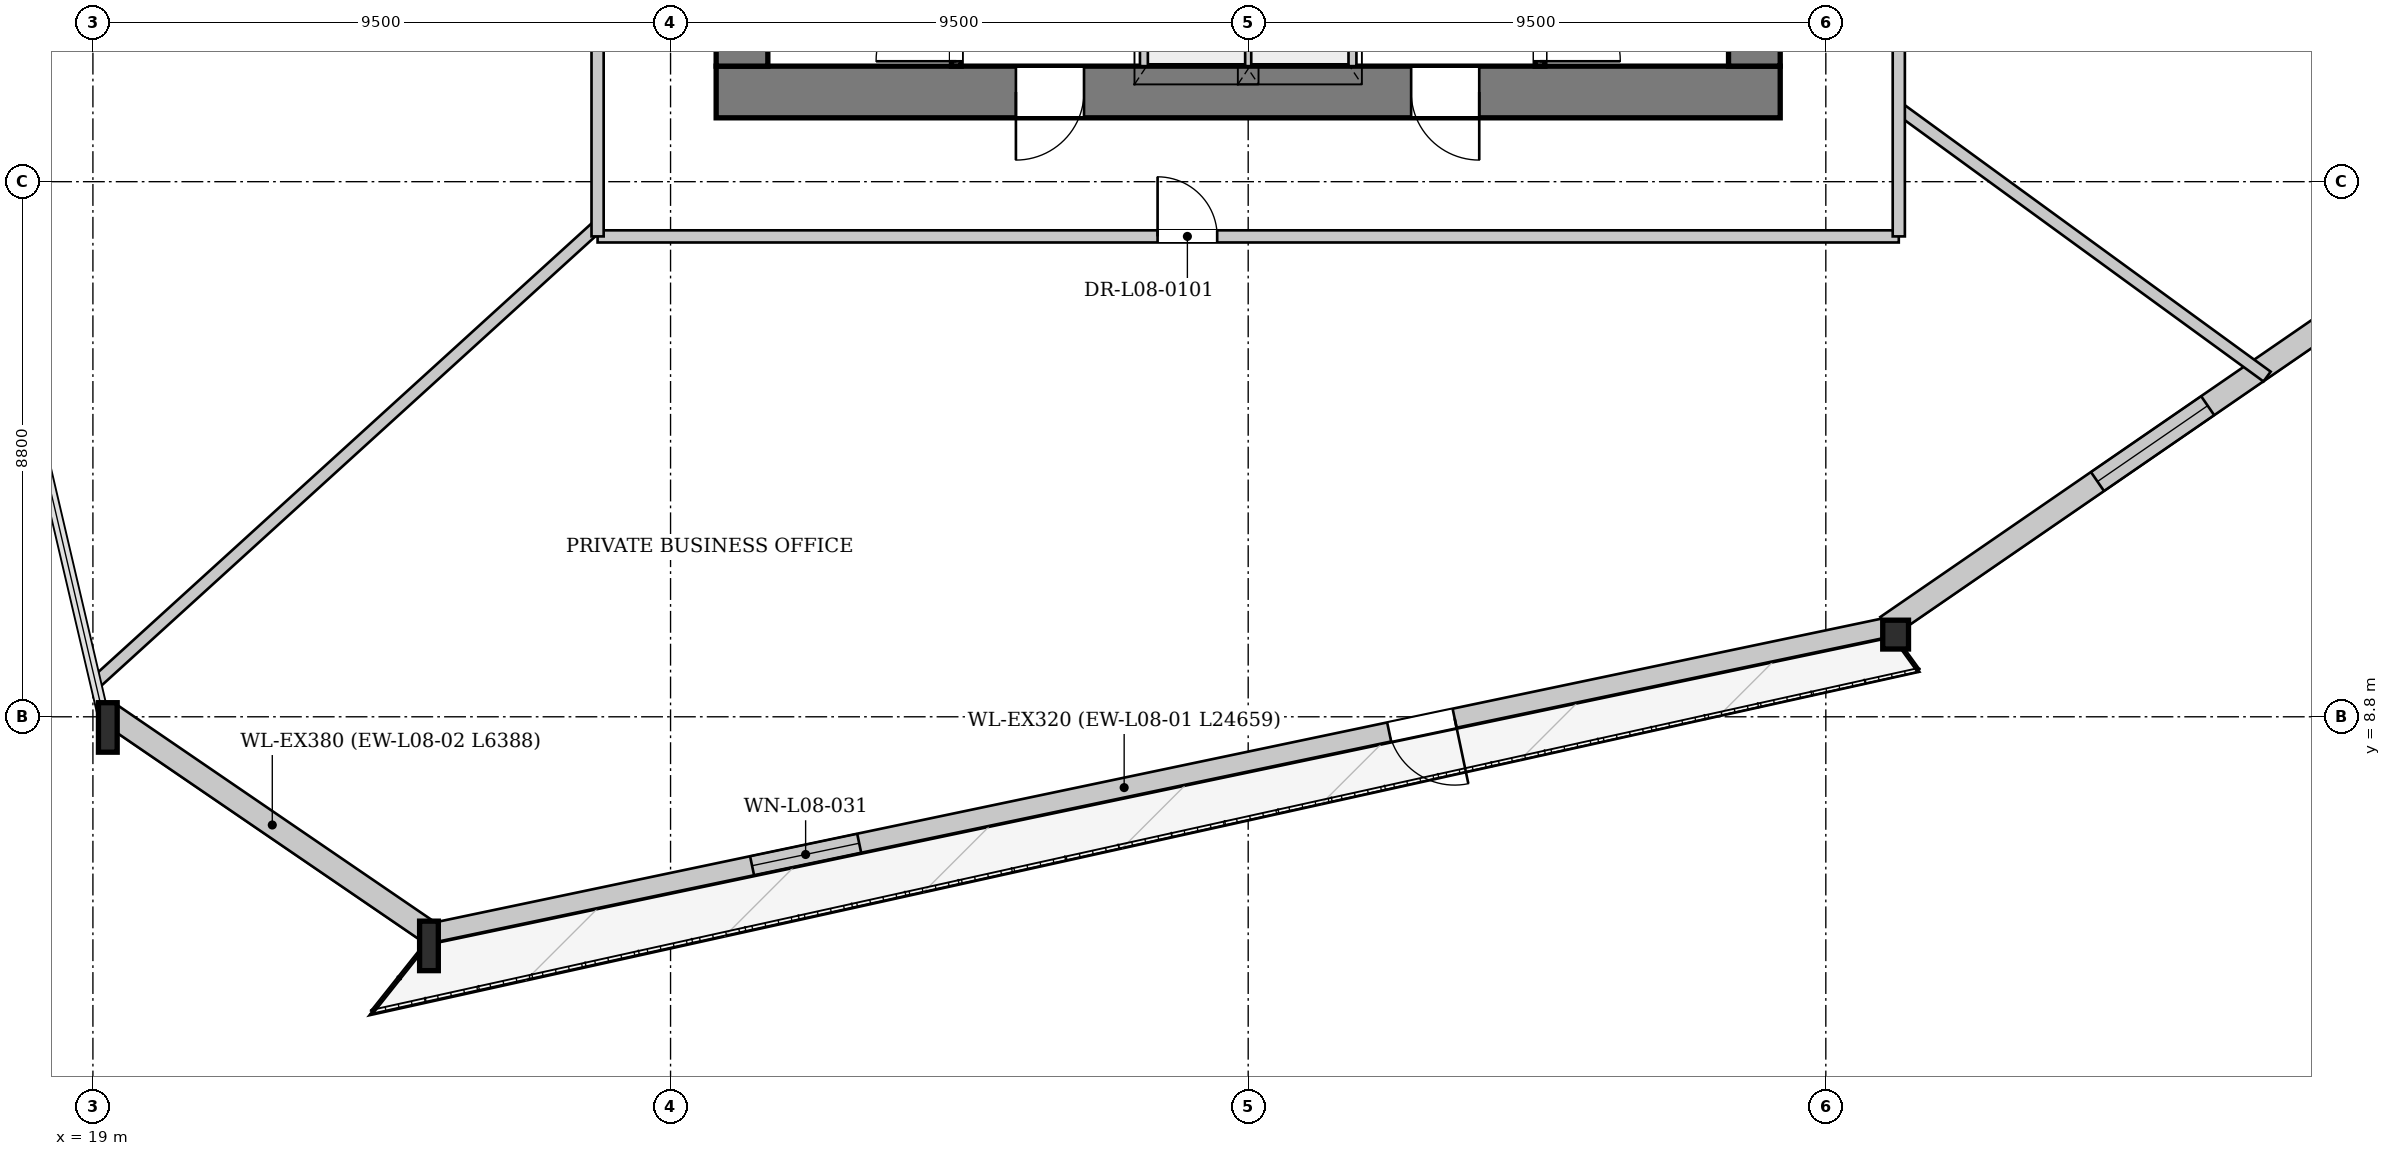
"""IFC4 building model, lengths in metres.
Left out: names, types, materials, properties, quantities, classifications, styles, units other than length and angle.
Written with IfcOpenShell. Run it as: python <this file> out.ifc"""

import sys

from ifc_helpers import new_model, si_unit, direction, frame, frame_2d, origin, origin_2d, place, context, subcontext, project, spatial, rectangle, i_section, extrude, source, transform, mapped, element, fill, save


model = new_model("IFC4")
c1 = context("Model", 3, precision=1e-05, world=origin(), true_north=direction((0.0, 1.0)))
c2 = subcontext(c1, "Body", "Model", "MODEL_VIEW")
j1 = project(units=[si_unit("LENGTHUNIT", "METRE"), si_unit("PLANEANGLEUNIT", "RADIAN")], contexts=[c1])
p1 = place(None, origin())
s1 = spatial("IfcSite", under=j1, at=p1, CompositionType="ELEMENT")
p2 = place(p1, origin())
s2 = spatial("IfcBuilding", under=s1, at=p2, CompositionType="ELEMENT")
p3 = place(p2, frame((0.0, 0.0, 36.4)))
s3 = spatial("IfcBuildingStorey", under=s2, at=p3, CompositionType="ELEMENT", Elevation=36.4)
m1 = source(origin(), c2, "Body", "SweptSolid", [
    extrude(i_section(OverallWidth=0.308, OverallDepth=0.814, WebThickness=0.021, FlangeThickness=0.04, at=origin_2d()), origin(), (0.0, 0.0, 1.0), 3.387),
])
p4 = place(p3, frame((19.206, 8.666, 0.0), z_axis=(0.023138869446, -0.024148041323, 0.999440575933), x_axis=(0.722033065516, 0.691858549345, 0.0)))
e1 = element("IfcColumn", 1, at=p4, inside=s3, PredefinedType="COLUMN", context=c2, shape_type="MappedRepresentation", body=[
    mapped(m1, transform((0.0, 0.0, 0.0), x_axis=(1.0, 0.0, 0.0), y_axis=(0.0, 1.0, 0.0), z_axis=(0.0, 0.0, 1.0), scale=1.0)),
])
m2 = source(origin(), c2, "Body", "SweptSolid", [
    extrude(i_section(OverallWidth=0.308, OverallDepth=0.814, WebThickness=0.021, FlangeThickness=0.04, at=origin_2d()), origin(), (0.0, 0.0, 1.0), 3.387),
])
p5 = place(p3, frame((24.479, 5.062, 0.0), z_axis=(0.027824902289, -0.017372542621, 0.99946183998), x_axis=(0.529603821593, 0.84824512504, 0.0)))
e2 = element("IfcColumn", 2, at=p5, inside=s3, PredefinedType="COLUMN", context=c2, shape_type="MappedRepresentation", body=[
    mapped(m2, transform((0.0, 0.0, 0.0), x_axis=(1.0, 0.0, 0.0), y_axis=(0.0, 1.0, 0.0), z_axis=(0.0, 0.0, 1.0), scale=1.0)),
])
m3 = source(origin(), c2, "Body", "SweptSolid", [
    extrude(i_section(OverallWidth=0.424, OverallDepth=0.474, WebThickness=0.043, FlangeThickness=0.068, at=origin_2d()), origin(), (0.0, 0.0, 1.0), 3.386),
])
p6 = place(p3, frame((48.612, 10.128, 0.0), z_axis=(0.02119771687, 0.01369920478, 0.999681443555), x_axis=(-0.54277739367, 0.839876598627, 0.0)))
e3 = element("IfcColumn", 3, at=p6, inside=s3, PredefinedType="COLUMN", context=c2, shape_type="MappedRepresentation", body=[
    mapped(m3, transform((0.0, 0.0, 0.0), x_axis=(1.0, 0.0, 0.0), y_axis=(0.0, 1.0, 0.0), z_axis=(0.0, 0.0, 1.0), scale=1.0)),
])
p7 = place(p3, frame((48.579, 10.285, 0.0), z_axis=(0.0, 0.0, 1.0), x_axis=(-0.978662775372, -0.205473044709, 0.0)))
e4 = element("IfcWall", 4, at=p7, inside=s3, PredefinedType="SOLIDWALL", context=c2, shape_type="SweptSolid", body=[
    extrude(rectangle(XDim=24.658, YDim=0.32, at=frame_2d((12.329, 0.0))), origin(), (0.0, 0.0, 1.0), 2.592),
])
p8 = place(p7, frame((7.341, 0.0, 0.0)))
e5 = element("IfcOpeningElement", 5, at=p8, cuts=e4, PredefinedType="OPENING", context=c2, shape_type="SweptSolid", body=[
    extrude(rectangle(XDim=1.1, YDim=2.3, at=frame_2d((0.55, 1.15))), frame((0.0, 0.17, 0.0), z_axis=(0.0, -1.0, 0.0), x_axis=(1.0, 0.0, 0.0)), (0.0, 0.0, 1.0), 0.34),
])
p9 = place(p7, frame((17.347, 0.0, 0.272)))
e6 = element("IfcOpeningElement", 6, at=p9, cuts=e4, PredefinedType="OPENING", context=c2, shape_type="SweptSolid", body=[
    extrude(rectangle(XDim=1.8, YDim=2.2, at=frame_2d((0.9, 1.1))), frame((0.0, 0.17, 0.0), z_axis=(0.0, -1.0, 0.0), x_axis=(1.0, 0.0, 0.0)), (0.0, 0.0, 1.0), 0.34),
])
p10 = place(p3, frame((24.587, 5.219, 0.0), z_axis=(0.0, 0.0, 1.0), x_axis=(-0.825615561524, 0.564233058735, 0.0)))
e7 = element("IfcWall", 7, at=p10, inside=s3, PredefinedType="SOLIDWALL", context=c2, shape_type="SweptSolid", body=[
    extrude(rectangle(XDim=6.388, YDim=0.38, at=frame_2d((3.194, 0.0))), origin(), (0.0, 0.0, 1.0), 2.592),
])
p11 = place(p3, frame((68.816, 24.266, 0.0), z_axis=(0.0, 0.0, 1.0), x_axis=(-0.823714768531, -0.567004391608, 0.0)))
e8 = element("IfcWall", 8, at=p11, inside=s3, PredefinedType="SOLIDWALL", context=c2, shape_type="SweptSolid", body=[
    extrude(rectangle(XDim=24.658, YDim=0.38, at=frame_2d((12.329, 0.0))), origin(), (0.0, 0.0, 1.0), 2.592),
])
p12 = place(p11, frame((5.804, 0.0, 0.222)))
e9 = element("IfcOpeningElement", 9, at=p12, cuts=e8, PredefinedType="OPENING", context=c2, shape_type="SweptSolid", body=[
    extrude(rectangle(XDim=2.2, YDim=2.25, at=frame_2d((1.1, 1.125))), frame((0.0, 0.2, 0.0), z_axis=(0.0, -1.0, 0.0), x_axis=(1.0, 0.0, 0.0)), (0.0, 0.0, 1.0), 0.4),
])
p13 = place(p11, frame((18.254, 0.0, 0.222)))
e10 = element("IfcOpeningElement", 10, at=p13, cuts=e8, PredefinedType="OPENING", context=c2, shape_type="SweptSolid", body=[
    extrude(rectangle(XDim=2.2, YDim=2.25, at=frame_2d((1.1, 1.125))), frame((0.0, 0.2, 0.0), z_axis=(0.0, -1.0, 0.0), x_axis=(1.0, 0.0, 0.0)), (0.0, 0.0, 1.0), 0.4),
])
p14 = place(p3, frame((46.75, 19.075, 0.0), z_axis=(0.0, 0.0, 1.0), x_axis=(-1.0, 0.0, 0.0)))
e11 = element("IfcWall", 11, at=p14, inside=s3, PredefinedType="SHEAR", context=c2, shape_type="SweptSolid", body=[
    extrude(rectangle(XDim=17.5, YDim=0.85, at=frame_2d((8.75, 0.0))), origin(), (0.0, 0.0, 1.0), 3.3),
])
p15 = place(p14, frame((4.95, 0.0, 0.0)))
e12 = element("IfcOpeningElement", 12, at=p15, cuts=e11, PredefinedType="OPENING", context=c2, shape_type="SweptSolid", body=[
    extrude(rectangle(XDim=1.12, YDim=2.25, at=frame_2d((0.56, 1.125))), frame((0.0, 0.435, 0.0), z_axis=(0.0, -1.0, 0.0), x_axis=(1.0, 0.0, 0.0)), (0.0, 0.0, 1.0), 0.87),
])
p16 = place(p14, frame((11.45, 0.0, 0.0)))
e13 = element("IfcOpeningElement", 13, at=p16, cuts=e11, PredefinedType="OPENING", context=c2, shape_type="SweptSolid", body=[
    extrude(rectangle(XDim=1.12, YDim=2.25, at=frame_2d((0.56, 1.125))), frame((0.0, 0.435, 0.0), z_axis=(0.0, -1.0, 0.0), x_axis=(1.0, 0.0, 0.0)), (0.0, 0.0, 1.0), 0.87),
])
p17 = place(p3, frame((29.675, 19.5, 0.0), z_axis=(0.0, 0.0, 1.0), x_axis=(0.0, 1.0, 0.0)))
e14 = element("IfcWall", 14, at=p17, inside=s3, PredefinedType="SHEAR", context=c2, shape_type="SweptSolid", body=[
    extrude(rectangle(XDim=14.2, YDim=0.85, at=frame_2d((7.1, 0.0))), origin(), (0.0, 0.0, 1.0), 3.3),
])
p18 = place(p17, frame((7.42, 0.0, 0.0)))
e15 = element("IfcOpeningElement", 15, at=p18, cuts=e14, PredefinedType="OPENING", context=c2, shape_type="SweptSolid", body=[
    extrude(rectangle(XDim=1.6, YDim=2.2, at=frame_2d((0.8, 1.1))), frame((0.0, 0.435, 0.0), z_axis=(0.0, -1.0, 0.0), x_axis=(1.0, 0.0, 0.0)), (0.0, 0.0, 1.0), 0.87),
])
p19 = place(p3, frame((46.325, 33.7, 0.0), z_axis=(0.0, 0.0, 1.0), x_axis=(0.0, -1.0, 0.0)))
e16 = element("IfcWall", 16, at=p19, inside=s3, PredefinedType="SHEAR", context=c2, shape_type="SweptSolid", body=[
    extrude(rectangle(XDim=14.2, YDim=0.85, at=frame_2d((7.1, 0.0))), origin(), (0.0, 0.0, 1.0), 3.3),
])
p20 = place(p19, frame((5.18, 0.0, 0.0)))
e17 = element("IfcOpeningElement", 17, at=p20, cuts=e16, PredefinedType="OPENING", context=c2, shape_type="SweptSolid", body=[
    extrude(rectangle(XDim=1.6, YDim=2.2, at=frame_2d((0.8, 1.1))), frame((0.0, 0.435, 0.0), z_axis=(0.0, -1.0, 0.0), x_axis=(1.0, 0.0, 0.0)), (0.0, 0.0, 1.0), 0.87),
])
p21 = place(p3, frame((33.2, 19.5, 0.0), z_axis=(0.0, 0.0, 1.0), x_axis=(0.0, 1.0, 0.0)))
e18 = element("IfcWall", 18, at=p21, inside=s3, PredefinedType="PARTITIONING", context=c2, shape_type="SweptSolid", body=[
    extrude(rectangle(XDim=7.46, YDim=0.16, at=frame_2d((3.73, 0.0))), origin(), (0.0, 0.0, 1.0), 3.3),
])
p22 = place(p21, frame((0.08, 0.0, 0.0)))
e19 = element("IfcOpeningElement", 19, at=p22, cuts=e18, PredefinedType="OPENING", context=c2, shape_type="SweptSolid", body=[
    extrude(rectangle(XDim=1.32, YDim=2.2, at=frame_2d((0.66, 1.1))), frame((0.0, 0.09, 0.0), z_axis=(0.0, -1.0, 0.0), x_axis=(1.0, 0.0, 0.0)), (0.0, 0.0, 1.0), 0.18),
])
p23 = place(p3, frame((42.8, 26.96, 0.0), z_axis=(0.0, 0.0, 1.0), x_axis=(0.0, -1.0, 0.0)))
e20 = element("IfcWall", 20, at=p23, inside=s3, PredefinedType="PARTITIONING", context=c2, shape_type="SweptSolid", body=[
    extrude(rectangle(XDim=7.46, YDim=0.16, at=frame_2d((3.73, 0.0))), origin(), (0.0, 0.0, 1.0), 3.3),
])
p24 = place(p23, frame((6.06, 0.0, 0.0)))
e21 = element("IfcOpeningElement", 21, at=p24, cuts=e20, PredefinedType="OPENING", context=c2, shape_type="SweptSolid", body=[
    extrude(rectangle(XDim=1.32, YDim=2.2, at=frame_2d((0.66, 1.1))), frame((0.0, 0.09, 0.0), z_axis=(0.0, -1.0, 0.0), x_axis=(1.0, 0.0, 0.0)), (0.0, 0.0, 1.0), 0.18),
])
p25 = place(p3, frame((36.3, 19.5, 0.0), z_axis=(0.0, 0.0, 1.0), x_axis=(0.0, 1.0, 0.0)))
e22 = element("IfcWall", 22, at=p25, inside=s3, PredefinedType="PARTITIONING", context=c2, shape_type="SweptSolid", body=[
    extrude(rectangle(XDim=4.78, YDim=0.16, at=frame_2d((2.39, 0.0))), origin(), (0.0, 0.0, 1.0), 3.3),
])
p26 = place(p25, frame((0.6, 0.0, 0.0)))
e23 = element("IfcOpeningElement", 23, at=p26, cuts=e22, PredefinedType="OPENING", context=c2, shape_type="SweptSolid", body=[
    extrude(rectangle(XDim=1.2, YDim=2.2, at=frame_2d((0.6, 1.1))), frame((0.0, 0.09, 0.0), z_axis=(0.0, -1.0, 0.0), x_axis=(1.0, 0.0, 0.0)), (0.0, 0.0, 1.0), 0.18),
])
p27 = place(p25, frame((2.65, 0.0, 0.0)))
e24 = element("IfcOpeningElement", 24, at=p27, cuts=e22, PredefinedType="OPENING", context=c2, shape_type="SweptSolid", body=[
    extrude(rectangle(XDim=0.95, YDim=2.1, at=frame_2d((0.475, 1.05))), frame((0.0, 0.09, 0.0), z_axis=(0.0, -1.0, 0.0), x_axis=(1.0, 0.0, 0.0)), (0.0, 0.0, 1.0), 0.18),
])
p28 = place(p3, frame((39.7, 24.28, 0.0), z_axis=(0.0, 0.0, 1.0), x_axis=(0.0, -1.0, 0.0)))
e25 = element("IfcWall", 25, at=p28, inside=s3, PredefinedType="PARTITIONING", context=c2, shape_type="SweptSolid", body=[
    extrude(rectangle(XDim=4.78, YDim=0.16, at=frame_2d((2.39, 0.0))), origin(), (0.0, 0.0, 1.0), 3.3),
])
p29 = place(p28, frame((3.12, 0.0, 0.0)))
e26 = element("IfcOpeningElement", 26, at=p29, cuts=e25, PredefinedType="OPENING", context=c2, shape_type="SweptSolid", body=[
    extrude(rectangle(XDim=1.2, YDim=2.2, at=frame_2d((0.6, 1.1))), frame((0.0, 0.09, 0.0), z_axis=(0.0, -1.0, 0.0), x_axis=(1.0, 0.0, 0.0)), (0.0, 0.0, 1.0), 0.18),
])
p30 = place(p3, frame((38.0, 19.5, 0.0), z_axis=(0.0, 0.0, 1.0), x_axis=(0.0, 1.0, 0.0)))
e27 = element("IfcWall", 27, at=p30, inside=s3, PredefinedType="PARTITIONING", context=c2, shape_type="SweptSolid", body=[
    extrude(rectangle(XDim=2.46, YDim=0.125, at=frame_2d((1.23, 0.0))), origin(), (0.0, 0.0, 1.0), 3.3),
])
p31 = place(p3, frame((27.3, 16.869, 0.0), z_axis=(0.0, 0.0, 1.0), x_axis=(-0.739798074748, -0.672828959394, 0.0)))
e28 = element("IfcWall", 28, at=p31, inside=s3, PredefinedType="PARTITIONING", context=c2, shape_type="SweptSolid", body=[
    extrude(rectangle(XDim=11.126, YDim=0.2, at=frame_2d((5.563, 0.0))), origin(), (0.0, 0.0, 1.0), 3.3),
])
p32 = place(p3, frame((48.7, 18.807, 0.0), z_axis=(0.0, 0.0, 1.0), x_axis=(0.808338601766, -0.58871784829, 0.0)))
e29 = element("IfcWall", 29, at=p32, inside=s3, PredefinedType="PARTITIONING", context=c2, shape_type="SweptSolid", body=[
    extrude(rectangle(XDim=7.494, YDim=0.2, at=frame_2d((3.747, 0.0))), origin(), (0.0, 0.0, 1.0), 3.3),
])
p33 = place(p3, frame((27.3, 16.7, 0.0), z_axis=(0.0, 0.0, 1.0), x_axis=(1.0, 0.0, 0.0)))
e30 = element("IfcWall", 30, at=p33, inside=s3, PredefinedType="PARTITIONING", context=c2, shape_type="SweptSolid", body=[
    extrude(rectangle(XDim=21.4, YDim=0.2, at=frame_2d((10.7, 0.0))), origin(), (0.0, 0.0, 1.0), 3.3),
])
p34 = place(p33, frame((9.21, 0.0, 0.0)))
e31 = element("IfcOpeningElement", 31, at=p34, cuts=e30, PredefinedType="OPENING", context=c2, shape_type="SweptSolid", body=[
    extrude(rectangle(XDim=0.98, YDim=2.15, at=frame_2d((0.49, 1.075))), frame((0.0, 0.11, 0.0), z_axis=(0.0, -1.0, 0.0), x_axis=(1.0, 0.0, 0.0)), (0.0, 0.0, 1.0), 0.22),
])
p35 = place(p3, frame((27.3, 16.7, 0.0), z_axis=(0.0, 0.0, 1.0), x_axis=(0.0, 1.0, 0.0)))
e32 = element("IfcWall", 32, at=p35, inside=s3, PredefinedType="PARTITIONING", context=c2, shape_type="SweptSolid", body=[
    extrude(rectangle(XDim=19.8, YDim=0.2, at=frame_2d((9.9, 0.0))), origin(), (0.0, 0.0, 1.0), 3.3),
])
p36 = place(p35, frame((4.61, 0.0, 0.0)))
e33 = element("IfcOpeningElement", 33, at=p36, cuts=e32, PredefinedType="OPENING", context=c2, shape_type="SweptSolid", body=[
    extrude(rectangle(XDim=0.98, YDim=2.15, at=frame_2d((0.49, 1.075))), frame((0.0, 0.11, 0.0), z_axis=(0.0, -1.0, 0.0), x_axis=(1.0, 0.0, 0.0)), (0.0, 0.0, 1.0), 0.22),
])
p37 = place(p3, frame((48.7, 16.7, 0.0), z_axis=(0.0, 0.0, 1.0), x_axis=(0.0, 1.0, 0.0)))
e34 = element("IfcWall", 34, at=p37, inside=s3, PredefinedType="PARTITIONING", context=c2, shape_type="SweptSolid", body=[
    extrude(rectangle(XDim=19.8, YDim=0.2, at=frame_2d((9.9, 0.0))), origin(), (0.0, 0.0, 1.0), 3.3),
])
p38 = place(p37, frame((16.273, 0.0, 0.0)))
e35 = element("IfcOpeningElement", 35, at=p38, cuts=e34, PredefinedType="OPENING", context=c2, shape_type="SweptSolid", body=[
    extrude(rectangle(XDim=0.98, YDim=2.15, at=frame_2d((0.49, 1.075))), frame((0.0, 0.11, 0.0), z_axis=(0.0, -1.0, 0.0), x_axis=(1.0, 0.0, 0.0)), (0.0, 0.0, 1.0), 0.22),
])
p39 = place(p37, frame((4.331, 0.0, 0.0)))
e36 = element("IfcOpeningElement", 36, at=p39, cuts=e34, PredefinedType="OPENING", context=c2, shape_type="SweptSolid", body=[
    extrude(rectangle(XDim=0.98, YDim=2.15, at=frame_2d((0.49, 1.075))), frame((0.0, 0.11, 0.0), z_axis=(0.0, -1.0, 0.0), x_axis=(1.0, 0.0, 0.0)), (0.0, 0.0, 1.0), 0.22),
])
m4 = source(origin(), c2, "Body", "SweptSolid", [
    extrude(rectangle(XDim=1.1, YDim=2.3, at=frame_2d((0.55, 1.15))), frame((0.0, 0.025, 0.0), z_axis=(0.0, -1.0, 0.0), x_axis=(1.0, 0.0, 0.0)), (0.0, 0.0, 1.0), 0.05),
])
p40 = place(p8, origin())
e37 = element("IfcDoor", 37, at=p40, inside=s3, OperationType="SINGLE_SWING_LEFT", PredefinedType="DOOR", context=c2, shape_type="MappedRepresentation", body=[
    mapped(m4, transform((0.0, 0.0, 0.0), x_axis=(1.0, 0.0, 0.0), y_axis=(0.0, 1.0, 0.0), z_axis=(0.0, 0.0, 1.0), scale=1.0)),
])
fill(e5, e37)
m5 = source(origin(), c2, "Body", "SweptSolid", [
    extrude(rectangle(XDim=1.8, YDim=2.2, at=frame_2d((0.9, 1.1))), frame((0.0, 0.03, 0.0), z_axis=(0.0, -1.0, 0.0), x_axis=(1.0, 0.0, 0.0)), (0.0, 0.0, 1.0), 0.06),
])
p41 = place(p9, origin())
e38 = element("IfcWindow", 38, at=p41, inside=s3, PartitioningType="SINGLE_PANEL", PredefinedType="WINDOW", context=c2, shape_type="MappedRepresentation", body=[
    mapped(m5, transform((0.0, 0.0, 0.0), x_axis=(1.0, 0.0, 0.0), y_axis=(0.0, 1.0, 0.0), z_axis=(0.0, 0.0, 1.0), scale=1.0)),
])
fill(e6, e38)
m6 = source(origin(), c2, "Body", "SweptSolid", [
    extrude(rectangle(XDim=2.2, YDim=2.25, at=frame_2d((1.1, 1.125))), frame((0.0, 0.03, 0.0), z_axis=(0.0, -1.0, 0.0), x_axis=(1.0, 0.0, 0.0)), (0.0, 0.0, 1.0), 0.06),
])
p42 = place(p13, origin())
e39 = element("IfcWindow", 39, at=p42, inside=s3, PartitioningType="SINGLE_PANEL", PredefinedType="WINDOW", context=c2, shape_type="MappedRepresentation", body=[
    mapped(m6, transform((0.0, 0.0, 0.0), x_axis=(1.0, 0.0, 0.0), y_axis=(0.0, 1.0, 0.0), z_axis=(0.0, 0.0, 1.0), scale=1.0)),
])
fill(e10, e39)
m7 = source(origin(), c2, "Body", "SweptSolid", [
    extrude(rectangle(XDim=1.12, YDim=2.25, at=frame_2d((0.56, 1.125))), frame((0.0, 0.025, 0.0), z_axis=(0.0, -1.0, 0.0), x_axis=(1.0, 0.0, 0.0)), (0.0, 0.0, 1.0), 0.05),
])
p43 = place(p15, origin())
e40 = element("IfcDoor", 40, at=p43, inside=s3, OperationType="SINGLE_SWING_LEFT", PredefinedType="DOOR", context=c2, shape_type="MappedRepresentation", body=[
    mapped(m7, transform((0.0, 0.0, 0.0), x_axis=(1.0, 0.0, 0.0), y_axis=(0.0, 1.0, 0.0), z_axis=(0.0, 0.0, 1.0), scale=1.0)),
])
fill(e12, e40)
p44 = place(p16, origin())
e41 = element("IfcDoor", 41, at=p44, inside=s3, OperationType="SINGLE_SWING_RIGHT", PredefinedType="DOOR", context=c2, shape_type="MappedRepresentation", body=[
    mapped(m7, transform((0.0, 0.0, 0.0), x_axis=(1.0, 0.0, 0.0), y_axis=(0.0, 1.0, 0.0), z_axis=(0.0, 0.0, 1.0), scale=1.0)),
])
fill(e13, e41)
m8 = source(origin(), c2, "Body", "SweptSolid", [
    extrude(rectangle(XDim=1.32, YDim=2.2, at=frame_2d((0.66, 1.1))), frame((0.0, 0.025, 0.0), z_axis=(0.0, -1.0, 0.0), x_axis=(1.0, 0.0, 0.0)), (0.0, 0.0, 1.0), 0.05),
])
p45 = place(p22, origin())
e42 = element("IfcDoor", 42, at=p45, inside=s3, OperationType="SINGLE_SWING_LEFT", PredefinedType="DOOR", context=c2, shape_type="MappedRepresentation", body=[
    mapped(m8, transform((0.0, 0.0, 0.0), x_axis=(1.0, 0.0, 0.0), y_axis=(0.0, 1.0, 0.0), z_axis=(0.0, 0.0, 1.0), scale=1.0)),
])
fill(e19, e42)
p46 = place(p24, origin())
e43 = element("IfcDoor", 43, at=p46, inside=s3, OperationType="SINGLE_SWING_RIGHT", PredefinedType="DOOR", context=c2, shape_type="MappedRepresentation", body=[
    mapped(m8, transform((0.0, 0.0, 0.0), x_axis=(1.0, 0.0, 0.0), y_axis=(0.0, 1.0, 0.0), z_axis=(0.0, 0.0, 1.0), scale=1.0)),
])
fill(e21, e43)
m9 = source(origin(), c2, "Body", "SweptSolid", [
    extrude(rectangle(XDim=0.98, YDim=2.15, at=frame_2d((0.49, 1.075))), frame((0.0, 0.025, 0.0), z_axis=(0.0, -1.0, 0.0), x_axis=(1.0, 0.0, 0.0)), (0.0, 0.0, 1.0), 0.05),
])
p47 = place(p34, origin())
e44 = element("IfcDoor", 44, at=p47, inside=s3, OperationType="SINGLE_SWING_LEFT", PredefinedType="DOOR", context=c2, shape_type="MappedRepresentation", body=[
    mapped(m9, transform((0.0, 0.0, 0.0), x_axis=(1.0, 0.0, 0.0), y_axis=(0.0, 1.0, 0.0), z_axis=(0.0, 0.0, 1.0), scale=1.0)),
])
fill(e31, e44)
save(model, sys.argv[1])
